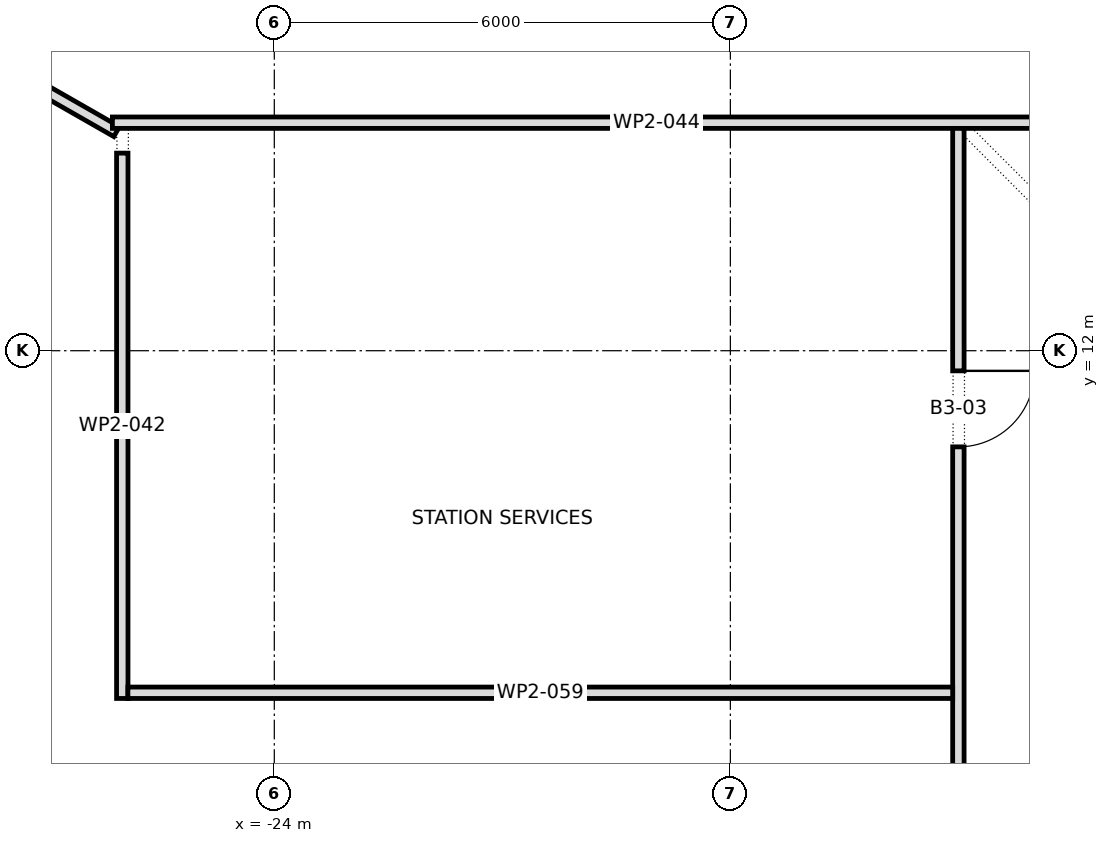
"""IFC4 building model, lengths in metres.
Left out: names, types, materials, properties, quantities, classifications, styles, units other than length and angle.
Written with IfcOpenShell. Run it as: python <this file> out.ifc"""

import sys

from ifc_helpers import new_model, si_unit, direction, frame, frame_2d, origin, place, context, subcontext, project, spatial, polyline, rectangle, outline, extrude, element, fill, save


model = new_model("IFC4")
c1 = context("Model", 3, precision=1e-05, world=origin(), true_north=direction((0.0, 1.0)))
c2 = subcontext(c1, "Body", "Model", "MODEL_VIEW")
j1 = project(units=[si_unit("LENGTHUNIT", "METRE"), si_unit("PLANEANGLEUNIT", "RADIAN")], contexts=[c1])
p1 = place(None, origin())
s1 = spatial("IfcSite", under=j1, at=p1, CompositionType="ELEMENT")
p2 = place(p1, origin())
s2 = spatial("IfcBuilding", under=s1, at=p2, CompositionType="ELEMENT")
p3 = place(p2, frame((0.0, 0.0, -15.0)))
s3 = spatial("IfcBuildingStorey", under=s2, at=p3, CompositionType="ELEMENT", Elevation=-15.0)
p4 = place(p3, frame((-26.0, 7.425, 0.0), z_axis=(0.0, 0.0, 1.0), x_axis=(0.0, 1.0, 0.0)))
e1 = element("IfcWall", 1, at=p4, inside=s3, PredefinedType="PARTITIONING", context=c2, shape_type="SweptSolid", body=[
    extrude(rectangle(XDim=7.175, YDim=0.15, at=frame_2d((3.587, 0.0))), origin(), (0.0, 0.0, 1.0), 5.15),
])
p5 = place(p3, frame((-26.074, 14.882, 0.0), z_axis=(0.0, 0.0, 1.0), x_axis=(-0.868133416031, 0.496330909746, 0.0)))
e2 = element("IfcWall", 2, at=p5, inside=s3, PredefinedType="PARTITIONING", context=c2, shape_type="SweptSolid", body=[
    extrude(outline(polyline([(0.0, -0.075), (5.604, -0.075), (5.626, 0.075), (0.0, 0.075), (0.0, -0.075)])), origin(), (0.0, 0.0, 1.0), 5.15),
])
p6 = place(p3, frame((-26.13, 15.0, 0.0), z_axis=(0.0, 0.0, 1.0), x_axis=(1.0, 0.0, 0.0)))
e3 = element("IfcWall", 3, at=p6, inside=s3, PredefinedType="PARTITIONING", context=c2, shape_type="SweptSolid", body=[
    extrude(rectangle(XDim=14.32, YDim=0.15, at=frame_2d((7.16, 0.0))), origin(), (0.0, 0.0, 1.0), 5.15),
])
p7 = place(p6, frame((12.28, 0.0, 0.0)))
e4 = element("IfcOpeningElement", 4, at=p7, cuts=e3, PredefinedType="OPENING", context=c2, shape_type="SweptSolid", body=[
    extrude(rectangle(XDim=1.0, YDim=2.1, at=frame_2d((0.5, 1.05))), frame((0.0, 0.087, 0.0), z_axis=(0.0, -1.0, 0.0), x_axis=(1.0, 0.0, 0.0)), (0.0, 0.0, 1.0), 0.174),
])
p8 = place(p3, frame((-20.68, 26.45, 0.0), z_axis=(0.0, 0.0, 1.0), x_axis=(0.616465586388, -0.787381851962, 0.0)))
e5 = element("IfcWall", 5, at=p8, inside=s3, PredefinedType="PARTITIONING", context=c2, shape_type="SweptSolid", body=[
    extrude(outline(polyline([(-0.011, -0.075), (14.1, -0.075), (14.1, 0.075), (0.011, 0.075), (-0.011, -0.075)])), origin(), (0.0, 0.0, 1.0), 5.15),
])
p9 = place(p3, frame((-15.0, -14.925, 0.0), z_axis=(0.0, 0.0, 1.0), x_axis=(0.0, 1.0, 0.0)))
e6 = element("IfcWall", 6, at=p9, inside=s3, PredefinedType="PARTITIONING", context=c2, shape_type="SweptSolid", body=[
    extrude(rectangle(XDim=29.85, YDim=0.15, at=frame_2d((14.925, 0.0))), origin(), (0.0, 0.0, 1.0), 5.15),
])
p10 = place(p9, frame((25.66, 0.0, 0.0)))
e7 = element("IfcOpeningElement", 7, at=p10, cuts=e6, PredefinedType="OPENING", context=c2, shape_type="SweptSolid", body=[
    extrude(rectangle(XDim=1.0, YDim=2.1, at=frame_2d((0.5, 1.05))), frame((0.0, 0.087, 0.0), z_axis=(0.0, -1.0, 0.0), x_axis=(1.0, 0.0, 0.0)), (0.0, 0.0, 1.0), 0.174),
])
p11 = place(p9, frame((3.19, 0.0, 0.0)))
e8 = element("IfcOpeningElement", 8, at=p11, cuts=e6, PredefinedType="OPENING", context=c2, shape_type="SweptSolid", body=[
    extrude(rectangle(XDim=1.0, YDim=2.1, at=frame_2d((0.5, 1.05))), frame((0.0, 0.087, 0.0), z_axis=(0.0, -1.0, 0.0), x_axis=(1.0, 0.0, 0.0)), (0.0, 0.0, 1.0), 0.174),
])
p12 = place(p9, frame((13.725, 0.0, 0.0)))
e9 = element("IfcOpeningElement", 9, at=p12, cuts=e6, PredefinedType="OPENING", context=c2, shape_type="SweptSolid", body=[
    extrude(rectangle(XDim=2.4, YDim=2.1, at=frame_2d((1.2, 1.05))), frame((0.0, 0.087, 0.0), z_axis=(0.0, -1.0, 0.0), x_axis=(1.0, 0.0, 0.0)), (0.0, 0.0, 1.0), 0.174),
])
p13 = place(p3, frame((-15.075, 7.5, 0.0), z_axis=(0.0, 0.0, 1.0), x_axis=(-1.0, 0.0, 0.0)))
e10 = element("IfcWall", 10, at=p13, inside=s3, PredefinedType="PARTITIONING", context=c2, shape_type="SweptSolid", body=[
    extrude(rectangle(XDim=10.851, YDim=0.15, at=frame_2d((5.426, 0.0))), origin(), (0.0, 0.0, 1.0), 5.15),
])
p14 = place(p10, frame((1.0, 0.0, 0.0), z_axis=(0.0, 0.0, 1.0), x_axis=(-1.0, 0.0, 0.0)))
e11 = element("IfcDoor", 11, at=p14, inside=s3, OperationType="SINGLE_SWING_RIGHT", PredefinedType="DOOR", context=c2, shape_type="SweptSolid", body=[
    extrude(rectangle(XDim=1.0, YDim=2.1, at=frame_2d((0.5, 1.05))), frame((0.0, 0.025, 0.0), z_axis=(0.0, -1.0, 0.0), x_axis=(1.0, 0.0, 0.0)), (0.0, 0.0, 1.0), 0.05),
])
fill(e7, e11)
save(model, sys.argv[1])
